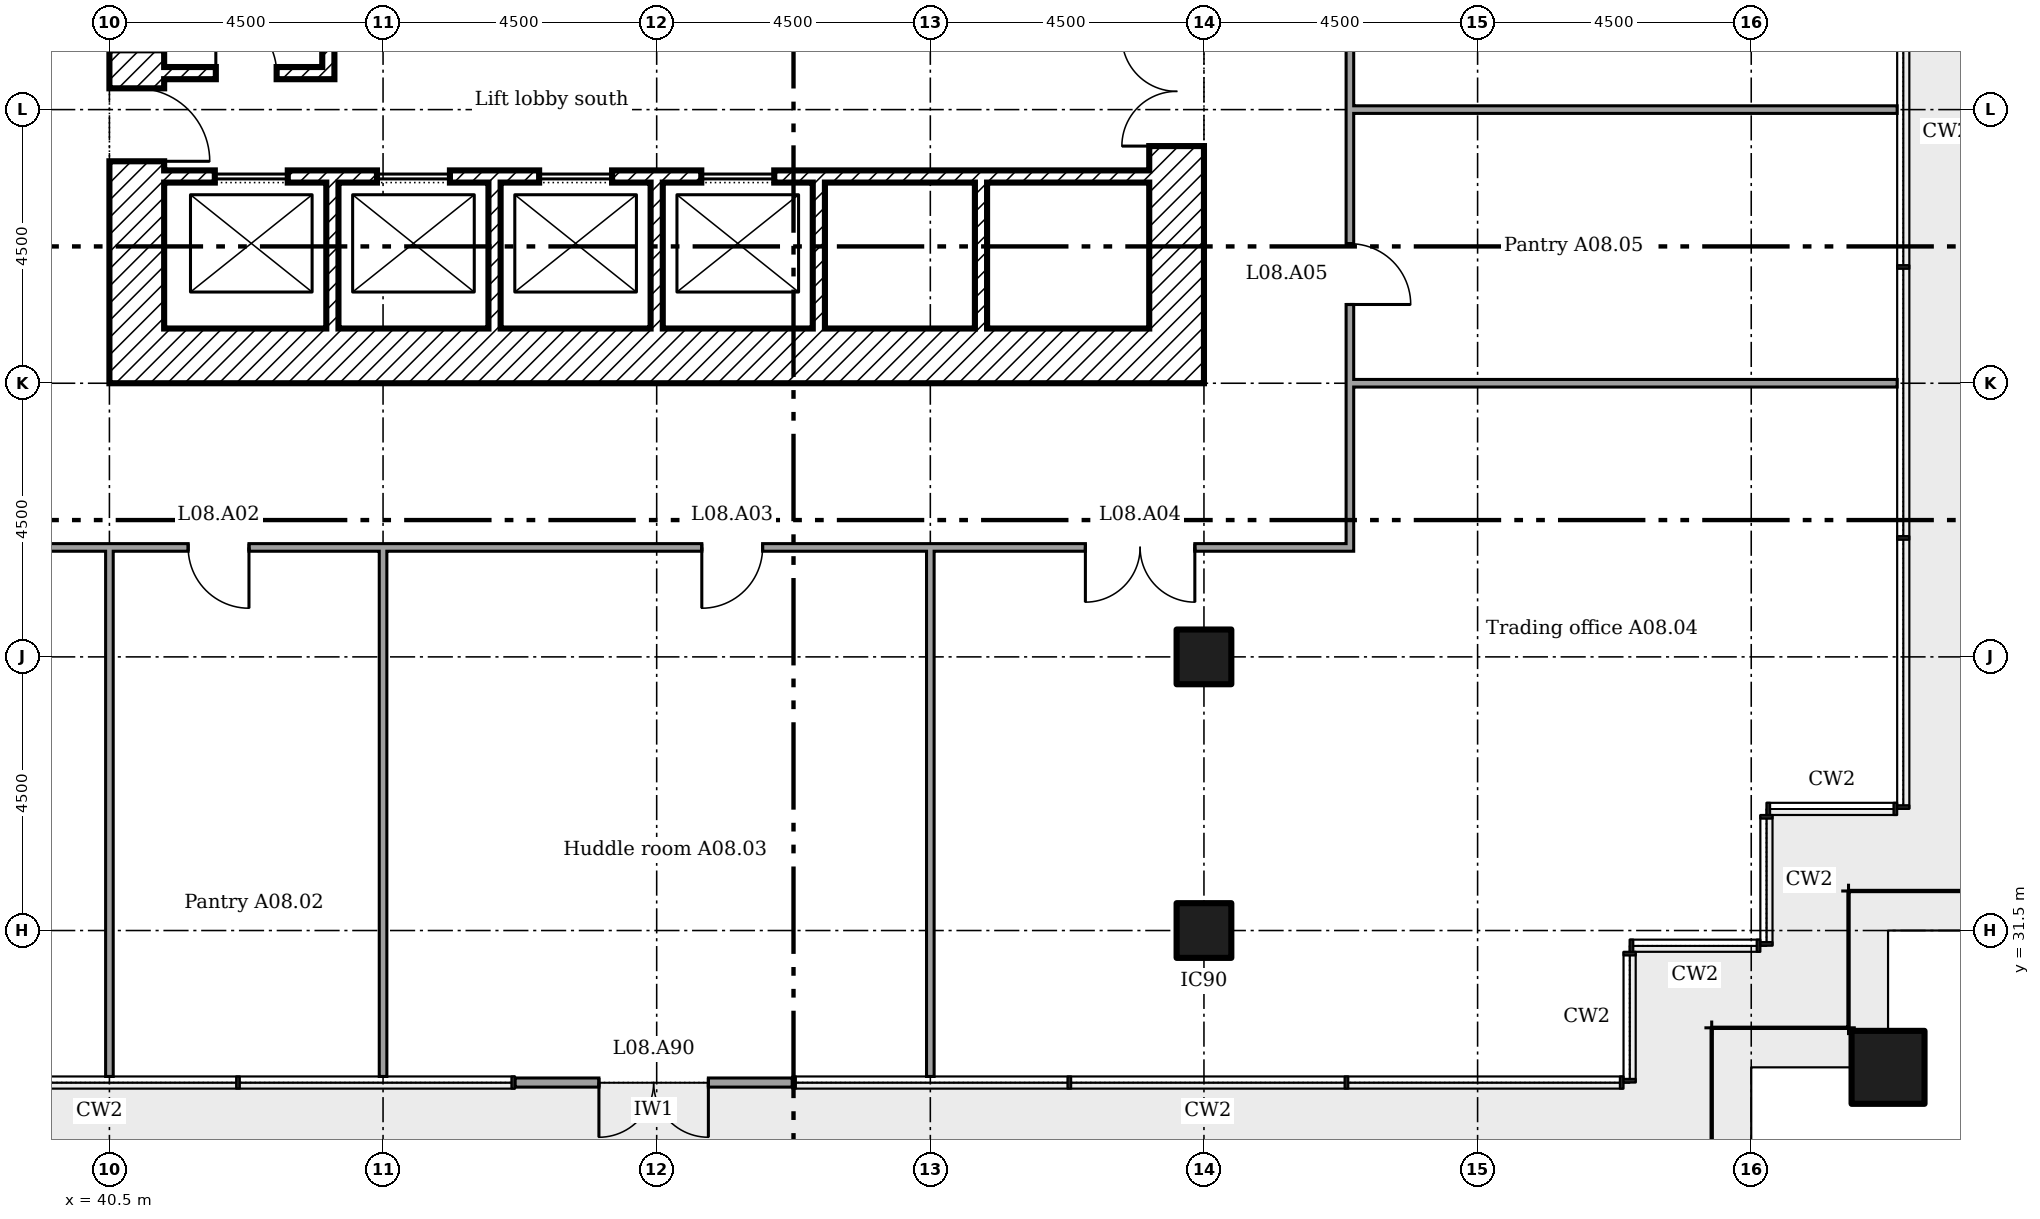
"""IFC4 building model, lengths in metres.
Left out: names, types, materials, properties, quantities, classifications, styles, units other than length and angle.
Written with IfcOpenShell. Run it as: python <this file> out.ifc"""

import sys

from ifc_helpers import new_model, si_unit, direction, frame, frame_2d, origin, origin_2d, place, context, subcontext, project, spatial, rectangle, extrude, element, fill, save


model = new_model("IFC4")
c1 = context("Model", 3, precision=1e-05, world=origin(), true_north=direction((0.0, 1.0)))
c2 = subcontext(c1, "Body", "Model", "MODEL_VIEW")
j1 = project(units=[si_unit("LENGTHUNIT", "METRE"), si_unit("PLANEANGLEUNIT", "RADIAN")], contexts=[c1])
p1 = place(None, origin())
s1 = spatial("IfcSite", under=j1, at=p1, CompositionType="ELEMENT")
p2 = place(p1, origin())
s2 = spatial("IfcBuilding", under=s1, at=p2, CompositionType="ELEMENT")
p3 = place(p2, frame((0.0, 0.0, 38.6)))
s3 = spatial("IfcBuildingStorey", under=s2, at=p3, CompositionType="ELEMENT", Elevation=38.6)
p4 = place(p3, frame((69.75, 29.25, 0.0)))
e1 = element("IfcColumn", 1, at=p4, inside=s3, PredefinedType="COLUMN", context=c2, shape_type="SweptSolid", body=[
    extrude(rectangle(XDim=1.2, YDim=1.2, at=origin_2d()), origin(), (0.0, 0.0, 1.0), 4.4),
])
for number, where in (
    (2, (58.5, 31.5, 0.0)),
    (3, (58.5, 36.0, 0.0)),
):
    element("IfcColumn", number, at=place(p3, frame(where)), inside=s3, PredefinedType="COLUMN", context=c2, shape_type="SweptSolid", body=[
        extrude(rectangle(XDim=0.9, YDim=0.9, at=origin_2d()), origin(), (0.0, 0.0, 1.0), 4.4),
    ])
p5 = place(p3, frame((47.171, 29.0, 0.0)))
e4 = element("IfcWall", 4, at=p5, inside=s3, PredefinedType="SOLIDWALL", context=c2, shape_type="SweptSolid", body=[
    extrude(rectangle(XDim=4.557, YDim=0.15, at=frame_2d((2.279, 0.0))), origin(), (0.0, 0.0, 1.0), 4.225),
])
p6 = place(p5, frame((1.379, 0.0, 0.0)))
e5 = element("IfcOpeningElement", 5, at=p6, cuts=e4, PredefinedType="OPENING", context=c2, shape_type="SweptSolid", body=[
    extrude(rectangle(XDim=1.8, YDim=2.4, at=frame_2d((0.9, 1.2))), frame((0.0, 0.085, 0.0), z_axis=(0.0, -1.0, 0.0), x_axis=(1.0, 0.0, 0.0)), (0.0, 0.0, 1.0), 0.17),
])
p7 = place(p3, frame((58.05, 40.5, 0.0), z_axis=(0.0, 0.0, 1.0), x_axis=(0.0, 1.0, 0.0)))
e6 = element("IfcWall", 6, at=p7, inside=s3, PredefinedType="SHEAR", context=c2, shape_type="SweptSolid", body=[
    extrude(rectangle(XDim=18.0, YDim=0.9, at=frame_2d((9.0, 0.0))), origin(), (0.0, 0.0, 1.0), 4.125),
])
p8 = place(p7, frame((13.15, 0.0, 0.0)))
e7 = element("IfcOpeningElement", 7, at=p8, cuts=e6, PredefinedType="OPENING", context=c2, shape_type="SweptSolid", body=[
    extrude(rectangle(XDim=1.2, YDim=2.1, at=frame_2d((0.6, 1.05))), frame((0.0, 0.46, 0.0), z_axis=(0.0, -1.0, 0.0), x_axis=(1.0, 0.0, 0.0)), (0.0, 0.0, 1.0), 0.92),
])
p9 = place(p7, frame((3.9, 0.0, 0.0)))
e8 = element("IfcOpeningElement", 8, at=p9, cuts=e6, PredefinedType="OPENING", context=c2, shape_type="SweptSolid", body=[
    extrude(rectangle(XDim=1.8, YDim=2.1, at=frame_2d((0.9, 1.05))), frame((0.0, 0.46, 0.0), z_axis=(0.0, -1.0, 0.0), x_axis=(1.0, 0.0, 0.0)), (0.0, 0.0, 1.0), 0.92),
])
p10 = place(p7, frame((11.525, 0.0, 0.0)))
e9 = element("IfcOpeningElement", 9, at=p10, cuts=e6, PredefinedType="OPENING", context=c2, shape_type="SweptSolid", body=[
    extrude(rectangle(XDim=1.0, YDim=2.1, at=frame_2d((0.5, 1.05))), frame((0.0, 0.46, 0.0), z_axis=(0.0, -1.0, 0.0), x_axis=(1.0, 0.0, 0.0)), (0.0, 0.0, 1.0), 0.92),
])
p11 = place(p3, frame((41.4, 40.95, 0.0)))
e10 = element("IfcWall", 10, at=p11, inside=s3, PredefinedType="SHEAR", context=c2, shape_type="SweptSolid", body=[
    extrude(rectangle(XDim=16.2, YDim=0.9, at=frame_2d((8.1, 0.0))), origin(), (0.0, 0.0, 1.0), 4.125),
])
p12 = place(p3, frame((40.95, 40.5, 0.0), z_axis=(0.0, 0.0, 1.0), x_axis=(0.0, 1.0, 0.0)))
e11 = element("IfcWall", 11, at=p12, inside=s3, PredefinedType="SHEAR", context=c2, shape_type="SweptSolid", body=[
    extrude(rectangle(XDim=18.0, YDim=0.9, at=frame_2d((9.0, 0.0))), origin(), (0.0, 0.0, 1.0), 4.125),
])
p13 = place(p12, frame((3.65, 0.0, 0.0)))
e12 = element("IfcOpeningElement", 12, at=p13, cuts=e11, PredefinedType="OPENING", context=c2, shape_type="SweptSolid", body=[
    extrude(rectangle(XDim=1.2, YDim=2.1, at=frame_2d((0.6, 1.05))), frame((0.0, 0.46, 0.0), z_axis=(0.0, -1.0, 0.0), x_axis=(1.0, 0.0, 0.0)), (0.0, 0.0, 1.0), 0.92),
])
p14 = place(p12, frame((5.475, 0.0, 0.0)))
e13 = element("IfcOpeningElement", 13, at=p14, cuts=e11, PredefinedType="OPENING", context=c2, shape_type="SweptSolid", body=[
    extrude(rectangle(XDim=1.0, YDim=2.1, at=frame_2d((0.5, 1.05))), frame((0.0, 0.46, 0.0), z_axis=(0.0, -1.0, 0.0), x_axis=(1.0, 0.0, 0.0)), (0.0, 0.0, 1.0), 0.92),
])
p15 = place(p12, frame((12.3, 0.0, 0.0)))
e14 = element("IfcOpeningElement", 14, at=p15, cuts=e11, PredefinedType="OPENING", context=c2, shape_type="SweptSolid", body=[
    extrude(rectangle(XDim=1.0, YDim=2.1, at=frame_2d((0.5, 1.05))), frame((0.0, 0.46, 0.0), z_axis=(0.0, -1.0, 0.0), x_axis=(1.0, 0.0, 0.0)), (0.0, 0.0, 1.0), 0.92),
])
for number, where, z_axis, x_axis in (
    (15, (44.167, 41.4, 0.0), (0.0, 0.0, 1.0), (0.0, 1.0, 0.0)),
    (16, (46.833, 41.4, 0.0), (0.0, 0.0, 1.0), (0.0, 1.0, 0.0)),
    (17, (49.5, 41.4, 0.0), (0.0, 0.0, 1.0), (0.0, 1.0, 0.0)),
    (18, (52.167, 41.4, 0.0), (0.0, 0.0, 1.0), (0.0, 1.0, 0.0)),
    (19, (54.833, 41.4, 0.0), (0.0, 0.0, 1.0), (0.0, 1.0, 0.0)),
):
    element("IfcWall", number, at=place(p3, frame(where, z_axis=z_axis, x_axis=x_axis)), inside=s3, PredefinedType="SHEAR", context=c2, shape_type="SweptSolid", body=[
        extrude(rectangle(XDim=2.4, YDim=0.2, at=frame_2d((1.2, 0.0))), origin(), (0.0, 0.0, 1.0), 4.125),
    ])
p16 = place(p3, frame((41.4, 43.9, 0.0)))
e20 = element("IfcWall", 20, at=p16, inside=s3, PredefinedType="SHEAR", context=c2, shape_type="SweptSolid", body=[
    extrude(rectangle(XDim=16.2, YDim=0.2, at=frame_2d((8.1, 0.0))), origin(), (0.0, 0.0, 1.0), 4.125),
])
p17 = place(p16, frame((0.833, 0.0, 0.0)))
e21 = element("IfcOpeningElement", 21, at=p17, cuts=e20, PredefinedType="OPENING", context=c2, shape_type="SweptSolid", body=[
    extrude(rectangle(XDim=1.2, YDim=2.1, at=frame_2d((0.6, 1.05))), frame((0.0, 0.11, 0.0), z_axis=(0.0, -1.0, 0.0), x_axis=(1.0, 0.0, 0.0)), (0.0, 0.0, 1.0), 0.22),
])
p18 = place(p16, frame((3.5, 0.0, 0.0)))
e22 = element("IfcOpeningElement", 22, at=p18, cuts=e20, PredefinedType="OPENING", context=c2, shape_type="SweptSolid", body=[
    extrude(rectangle(XDim=1.2, YDim=2.1, at=frame_2d((0.6, 1.05))), frame((0.0, 0.11, 0.0), z_axis=(0.0, -1.0, 0.0), x_axis=(1.0, 0.0, 0.0)), (0.0, 0.0, 1.0), 0.22),
])
p19 = place(p16, frame((6.167, 0.0, 0.0)))
e23 = element("IfcOpeningElement", 23, at=p19, cuts=e20, PredefinedType="OPENING", context=c2, shape_type="SweptSolid", body=[
    extrude(rectangle(XDim=1.2, YDim=2.1, at=frame_2d((0.6, 1.05))), frame((0.0, 0.11, 0.0), z_axis=(0.0, -1.0, 0.0), x_axis=(1.0, 0.0, 0.0)), (0.0, 0.0, 1.0), 0.22),
])
p20 = place(p16, frame((8.833, 0.0, 0.0)))
e24 = element("IfcOpeningElement", 24, at=p20, cuts=e20, PredefinedType="OPENING", context=c2, shape_type="SweptSolid", body=[
    extrude(rectangle(XDim=1.2, YDim=2.1, at=frame_2d((0.6, 1.05))), frame((0.0, 0.11, 0.0), z_axis=(0.0, -1.0, 0.0), x_axis=(1.0, 0.0, 0.0)), (0.0, 0.0, 1.0), 0.22),
])
p21 = place(p3, frame((44.1, 45.5, 0.0), z_axis=(0.0, 0.0, 1.0), x_axis=(0.0, 1.0, 0.0)))
e25 = element("IfcWall", 25, at=p21, inside=s3, PredefinedType="SHEAR", context=c2, shape_type="SweptSolid", body=[
    extrude(rectangle(XDim=6.9, YDim=0.2, at=frame_2d((3.45, 0.0))), origin(), (0.0, 0.0, 1.0), 4.125),
])
p22 = place(p3, frame((41.4, 45.6, 0.0)))
e26 = element("IfcWall", 26, at=p22, inside=s3, PredefinedType="SHEAR", context=c2, shape_type="SweptSolid", body=[
    extrude(rectangle(XDim=2.6, YDim=0.2, at=frame_2d((1.3, 0.0))), origin(), (0.0, 0.0, 1.0), 4.125),
])
p23 = place(p22, frame((0.85, 0.0, 0.0)))
e27 = element("IfcOpeningElement", 27, at=p23, cuts=e26, PredefinedType="OPENING", context=c2, shape_type="SweptSolid", body=[
    extrude(rectangle(XDim=1.0, YDim=2.1, at=frame_2d((0.5, 1.05))), frame((0.0, 0.11, 0.0), z_axis=(0.0, -1.0, 0.0), x_axis=(1.0, 0.0, 0.0)), (0.0, 0.0, 1.0), 0.22),
])
p24 = place(p3, frame((38.038, 37.8, 0.0)))
e28 = element("IfcWall", 28, at=p24, inside=s3, PredefinedType="PARTITIONING", context=c2, shape_type="SweptSolid", body=[
    extrude(rectangle(XDim=22.925, YDim=0.125, at=frame_2d((11.462, 0.0))), origin(), (0.0, 0.0, 1.0), 4.225),
])
p25 = place(p24, frame((3.758, 0.0, 0.0)))
e29 = element("IfcOpeningElement", 29, at=p25, cuts=e28, PredefinedType="OPENING", context=c2, shape_type="SweptSolid", body=[
    extrude(rectangle(XDim=1.0, YDim=2.1, at=frame_2d((0.5, 1.05))), frame((0.0, 0.073, 0.0), z_axis=(0.0, -1.0, 0.0), x_axis=(1.0, 0.0, 0.0)), (0.0, 0.0, 1.0), 0.145),
])
p26 = place(p24, frame((12.205, 0.0, 0.0)))
e30 = element("IfcOpeningElement", 30, at=p26, cuts=e28, PredefinedType="OPENING", context=c2, shape_type="SweptSolid", body=[
    extrude(rectangle(XDim=1.0, YDim=2.1, at=frame_2d((0.5, 1.05))), frame((0.0, 0.073, 0.0), z_axis=(0.0, -1.0, 0.0), x_axis=(1.0, 0.0, 0.0)), (0.0, 0.0, 1.0), 0.145),
])
p27 = place(p24, frame((18.512, 0.0, 0.0)))
e31 = element("IfcOpeningElement", 31, at=p27, cuts=e28, PredefinedType="OPENING", context=c2, shape_type="SweptSolid", body=[
    extrude(rectangle(XDim=1.8, YDim=2.1, at=frame_2d((0.9, 1.05))), frame((0.0, 0.073, 0.0), z_axis=(0.0, -1.0, 0.0), x_axis=(1.0, 0.0, 0.0)), (0.0, 0.0, 1.0), 0.145),
])
for number, where in (
    (32, (60.9, 40.5, 0.0)),
    (33, (60.9, 45.0, 0.0)),
):
    element("IfcWall", number, at=place(p3, frame(where)), inside=s3, PredefinedType="PARTITIONING", context=c2, shape_type="SweptSolid", body=[
        extrude(rectangle(XDim=9.0, YDim=0.125, at=frame_2d((4.5, 0.0))), origin(), (0.0, 0.0, 1.0), 3.467),
    ])
for number, where, z_axis, x_axis in (
    (34, (40.5, 29.1, 0.0), (0.0, 0.0, 1.0), (0.0, 1.0, 0.0)),
    (35, (45.0, 29.1, 0.0), (0.0, 0.0, 1.0), (0.0, 1.0, 0.0)),
    (36, (54.0, 29.1, 0.0), (0.0, 0.0, 1.0), (0.0, 1.0, 0.0)),
):
    element("IfcWall", number, at=place(p3, frame(where, z_axis=z_axis, x_axis=x_axis)), inside=s3, PredefinedType="PARTITIONING", context=c2, shape_type="SweptSolid", body=[
        extrude(rectangle(XDim=8.7, YDim=0.125, at=frame_2d((4.35, 0.0))), origin(), (0.0, 0.0, 1.0), 3.467),
    ])
p28 = place(p3, frame((60.9, 37.863, 0.0), z_axis=(0.0, 0.0, 1.0), x_axis=(0.0, 1.0, 0.0)))
e37 = element("IfcWall", 37, at=p28, inside=s3, PredefinedType="PARTITIONING", context=c2, shape_type="SweptSolid", body=[
    extrude(rectangle(XDim=22.975, YDim=0.125, at=frame_2d((11.487, 0.0))), origin(), (0.0, 0.0, 1.0), 4.225),
])
p29 = place(p28, frame((3.933, 0.0, 0.0)))
e38 = element("IfcOpeningElement", 38, at=p29, cuts=e37, PredefinedType="OPENING", context=c2, shape_type="SweptSolid", body=[
    extrude(rectangle(XDim=1.0, YDim=2.1, at=frame_2d((0.5, 1.05))), frame((0.0, 0.073, 0.0), z_axis=(0.0, -1.0, 0.0), x_axis=(1.0, 0.0, 0.0)), (0.0, 0.0, 1.0), 0.145),
])
p30 = place(p28, frame((9.343, 0.0, 0.0)))
e39 = element("IfcOpeningElement", 39, at=p30, cuts=e37, PredefinedType="OPENING", context=c2, shape_type="SweptSolid", body=[
    extrude(rectangle(XDim=1.0, YDim=2.1, at=frame_2d((0.5, 1.05))), frame((0.0, 0.073, 0.0), z_axis=(0.0, -1.0, 0.0), x_axis=(1.0, 0.0, 0.0)), (0.0, 0.0, 1.0), 0.145),
])
p31 = place(p28, frame((15.637, 0.0, 0.0)))
e40 = element("IfcOpeningElement", 40, at=p31, cuts=e37, PredefinedType="OPENING", context=c2, shape_type="SweptSolid", body=[
    extrude(rectangle(XDim=1.0, YDim=2.1, at=frame_2d((0.5, 1.05))), frame((0.0, 0.073, 0.0), z_axis=(0.0, -1.0, 0.0), x_axis=(1.0, 0.0, 0.0)), (0.0, 0.0, 1.0), 0.145),
])
p32 = place(p6, frame((1.8, 0.0, 0.0), x_axis=(-1.0, 0.0, 0.0)))
e41 = element("IfcDoor", 41, at=p32, inside=s3, OperationType="DOUBLE_DOOR_DOUBLE_SWING", PredefinedType="NOTDEFINED", context=c2, shape_type="SweptSolid", body=[
    extrude(rectangle(XDim=1.8, YDim=2.4, at=frame_2d((0.9, 1.2))), frame((0.0, 0.025, 0.0), z_axis=(0.0, -1.0, 0.0), x_axis=(1.0, 0.0, 0.0)), (0.0, 0.0, 1.0), 0.05),
])
fill(e5, e41)
p33 = place(p9, origin())
e42 = element("IfcDoor", 42, at=p33, inside=s3, OperationType="DOUBLE_DOOR_SINGLE_SWING", PredefinedType="DOOR", context=c2, shape_type="SweptSolid", body=[
    extrude(rectangle(XDim=1.8, YDim=2.1, at=frame_2d((0.9, 1.05))), frame((0.0, 0.025, 0.0), z_axis=(0.0, -1.0, 0.0), x_axis=(1.0, 0.0, 0.0)), (0.0, 0.0, 1.0), 0.05),
])
fill(e8, e42)
p34 = place(p13, frame((1.2, 0.0, 0.0), x_axis=(-1.0, 0.0, 0.0)))
e43 = element("IfcDoor", 43, at=p34, inside=s3, OperationType="SINGLE_SWING_LEFT", PredefinedType="DOOR", context=c2, shape_type="SweptSolid", body=[
    extrude(rectangle(XDim=1.2, YDim=2.1, at=frame_2d((0.6, 1.05))), frame((0.0, 0.025, 0.0), z_axis=(0.0, -1.0, 0.0), x_axis=(1.0, 0.0, 0.0)), (0.0, 0.0, 1.0), 0.05),
])
fill(e12, e43)
p35 = place(p23, origin())
e44 = element("IfcDoor", 44, at=p35, inside=s3, OperationType="SINGLE_SWING_RIGHT", PredefinedType="DOOR", context=c2, shape_type="SweptSolid", body=[
    extrude(rectangle(XDim=1.0, YDim=2.1, at=frame_2d((0.5, 1.05))), frame((0.0, 0.025, 0.0), z_axis=(0.0, -1.0, 0.0), x_axis=(1.0, 0.0, 0.0)), (0.0, 0.0, 1.0), 0.05),
])
fill(e27, e44)
p36 = place(p17, origin())
e45 = element("IfcDoor", 45, at=p36, inside=s3, OperationType="SLIDING_TO_LEFT", PredefinedType="DOOR", context=c2, shape_type="SweptSolid", body=[
    extrude(rectangle(XDim=1.2, YDim=2.1, at=frame_2d((0.6, 1.05))), frame((0.0, 0.025, 0.0), z_axis=(0.0, -1.0, 0.0), x_axis=(1.0, 0.0, 0.0)), (0.0, 0.0, 1.0), 0.05),
])
fill(e21, e45)
p37 = place(p18, origin())
e46 = element("IfcDoor", 46, at=p37, inside=s3, OperationType="SLIDING_TO_LEFT", PredefinedType="DOOR", context=c2, shape_type="SweptSolid", body=[
    extrude(rectangle(XDim=1.2, YDim=2.1, at=frame_2d((0.6, 1.05))), frame((0.0, 0.025, 0.0), z_axis=(0.0, -1.0, 0.0), x_axis=(1.0, 0.0, 0.0)), (0.0, 0.0, 1.0), 0.05),
])
fill(e22, e46)
p38 = place(p19, origin())
e47 = element("IfcDoor", 47, at=p38, inside=s3, OperationType="SLIDING_TO_LEFT", PredefinedType="DOOR", context=c2, shape_type="SweptSolid", body=[
    extrude(rectangle(XDim=1.2, YDim=2.1, at=frame_2d((0.6, 1.05))), frame((0.0, 0.025, 0.0), z_axis=(0.0, -1.0, 0.0), x_axis=(1.0, 0.0, 0.0)), (0.0, 0.0, 1.0), 0.05),
])
fill(e23, e47)
p39 = place(p20, origin())
e48 = element("IfcDoor", 48, at=p39, inside=s3, OperationType="SLIDING_TO_LEFT", PredefinedType="DOOR", context=c2, shape_type="SweptSolid", body=[
    extrude(rectangle(XDim=1.2, YDim=2.1, at=frame_2d((0.6, 1.05))), frame((0.0, 0.025, 0.0), z_axis=(0.0, -1.0, 0.0), x_axis=(1.0, 0.0, 0.0)), (0.0, 0.0, 1.0), 0.05),
])
fill(e24, e48)
p40 = place(p25, frame((1.0, 0.0, 0.0), x_axis=(-1.0, 0.0, 0.0)))
e49 = element("IfcDoor", 49, at=p40, inside=s3, OperationType="SINGLE_SWING_RIGHT", PredefinedType="DOOR", context=c2, shape_type="SweptSolid", body=[
    extrude(rectangle(XDim=1.0, YDim=2.1, at=frame_2d((0.5, 1.05))), frame((0.0, 0.025, 0.0), z_axis=(0.0, -1.0, 0.0), x_axis=(1.0, 0.0, 0.0)), (0.0, 0.0, 1.0), 0.05),
])
fill(e29, e49)
p41 = place(p26, frame((1.0, 0.0, 0.0), x_axis=(-1.0, 0.0, 0.0)))
e50 = element("IfcDoor", 50, at=p41, inside=s3, OperationType="SINGLE_SWING_LEFT", PredefinedType="DOOR", context=c2, shape_type="SweptSolid", body=[
    extrude(rectangle(XDim=1.0, YDim=2.1, at=frame_2d((0.5, 1.05))), frame((0.0, 0.025, 0.0), z_axis=(0.0, -1.0, 0.0), x_axis=(1.0, 0.0, 0.0)), (0.0, 0.0, 1.0), 0.05),
])
fill(e30, e50)
p42 = place(p27, frame((1.8, 0.0, 0.0), x_axis=(-1.0, 0.0, 0.0)))
e51 = element("IfcDoor", 51, at=p42, inside=s3, OperationType="DOUBLE_DOOR_SINGLE_SWING", PredefinedType="DOOR", context=c2, shape_type="SweptSolid", body=[
    extrude(rectangle(XDim=1.8, YDim=2.1, at=frame_2d((0.9, 1.05))), frame((0.0, 0.025, 0.0), z_axis=(0.0, -1.0, 0.0), x_axis=(1.0, 0.0, 0.0)), (0.0, 0.0, 1.0), 0.05),
])
fill(e31, e51)
p43 = place(p29, frame((1.0, 0.0, 0.0), x_axis=(-1.0, 0.0, 0.0)))
e52 = element("IfcDoor", 52, at=p43, inside=s3, OperationType="SINGLE_SWING_LEFT", PredefinedType="DOOR", context=c2, shape_type="SweptSolid", body=[
    extrude(rectangle(XDim=1.0, YDim=2.1, at=frame_2d((0.5, 1.05))), frame((0.0, 0.025, 0.0), z_axis=(0.0, -1.0, 0.0), x_axis=(1.0, 0.0, 0.0)), (0.0, 0.0, 1.0), 0.05),
])
fill(e38, e52)
save(model, sys.argv[1])
